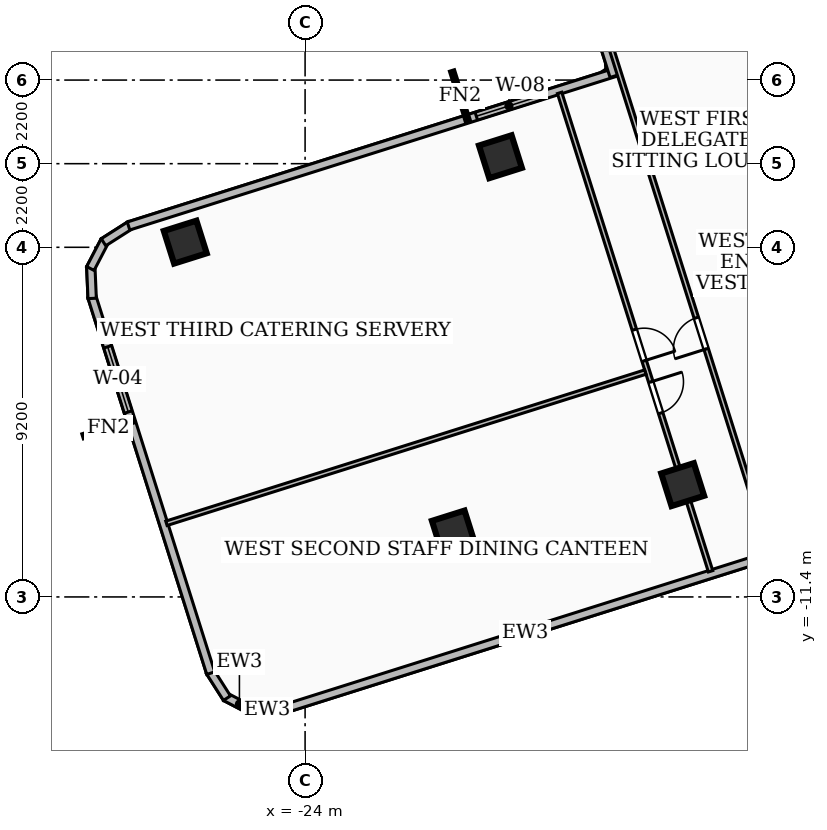
"""IFC4 building model, lengths in metres.
Left out: names, types, materials, properties, quantities, classifications, styles, units other than length and angle.
Written with IfcOpenShell. Run it as: python <this file> out.ifc"""

import sys

from ifc_helpers import new_model, si_unit, direction, frame, frame_2d, origin, origin_2d, place, context, subcontext, project, spatial, rectangle, extrude, element, fill, save


model = new_model("IFC4")
c1 = context("Model", 3, precision=1e-05, world=origin(), true_north=direction((0.0, 1.0)))
c2 = subcontext(c1, "Body", "Model", "MODEL_VIEW")
j1 = project(units=[si_unit("LENGTHUNIT", "METRE"), si_unit("PLANEANGLEUNIT", "RADIAN")], contexts=[c1])
p1 = place(None, origin())
s1 = spatial("IfcSite", under=j1, at=p1, CompositionType="ELEMENT")
p2 = place(p1, origin())
s2 = spatial("IfcBuilding", under=s1, at=p2, CompositionType="ELEMENT")
p3 = place(p2, frame((0.0, 0.0, 152.28)))
s3 = spatial("IfcBuildingStorey", under=s2, at=p3, CompositionType="ELEMENT", Elevation=152.28)
for number, where, z_axis, x_axis in (
    (1, (-18.86, 0.183, 0.0), (0.0, 0.0, 1.0), (0.954, 0.301, 0.0)),
    (2, (-14.064, -8.445, 0.0), (0.0, 0.0, 1.0), (0.954, 0.301, 0.0)),
    (3, (-27.153, -2.064, 0.0), (0.0, 0.0, 1.0), (0.954, 0.301, 0.0)),
    (4, (-20.098, -9.692, 0.0), (0.0, 0.0, 1.0), (0.954, 0.301, 0.0)),
):
    element("IfcColumn", number, at=place(p3, frame(where, z_axis=z_axis, x_axis=x_axis)), inside=s3, PredefinedType="COLUMN", context=c2, shape_type="SweptSolid", body=[
        extrude(rectangle(XDim=0.9, YDim=0.9, at=origin_2d()), origin(), (0.0, 0.0, 1.0), 3.6),
    ])
p4 = place(p3, frame((-11.792, -10.319, 0.0), z_axis=(0.0, 0.0, 1.0), x_axis=(-0.953607060649, -0.301054104573, 0.0)))
e5 = element("IfcWall", 5, at=p4, inside=s3, PredefinedType="SOLIDWALL", context=c2, shape_type="SweptSolid", body=[
    extrude(rectangle(XDim=13.459, YDim=0.22, at=frame_2d((6.73, 0.0))), origin(), (0.0, 0.0, 1.0), 2.152),
])
p5 = place(p3, frame((-24.578, -14.362, 0.0), z_axis=(0.0, 0.0, 1.0), x_axis=(-0.999075913973, -0.042980438793, 0.0)))
e6 = element("IfcWall", 6, at=p5, inside=s3, PredefinedType="SOLIDWALL", context=c2, shape_type="SweptSolid", body=[
    extrude(rectangle(XDim=0.835, YDim=0.22, at=frame_2d((0.417, 0.0))), origin(), (0.0, 0.0, 1.0), 3.34),
])
p6 = place(p3, frame((-25.365, -14.409, 0.0), z_axis=(0.0, 0.0, 1.0), x_axis=(-0.886542320322, 0.462647505427, 0.0)))
e7 = element("IfcWall", 7, at=p6, inside=s3, PredefinedType="SOLIDWALL", context=c2, shape_type="SweptSolid", body=[
    extrude(rectangle(XDim=0.819, YDim=0.22, at=frame_2d((0.41, 0.0))), origin(), (0.0, 0.0, 1.0), 3.34),
])
p7 = place(p3, frame((-26.056, -14.063, 0.0), z_axis=(0.0, 0.0, 1.0), x_axis=(-0.537481840432, 0.843275323489, 0.0)))
e8 = element("IfcWall", 8, at=p7, inside=s3, PredefinedType="SOLIDWALL", context=c2, shape_type="SweptSolid", body=[
    extrude(rectangle(XDim=0.833, YDim=0.22, at=frame_2d((0.417, 0.0))), origin(), (0.0, 0.0, 1.0), 3.34),
])
p8 = place(p3, frame((-26.483, -13.405, 0.0), z_axis=(0.0, 0.0, 1.0), x_axis=(-0.301132492372, 0.953582310049, 0.0)))
e9 = element("IfcWall", 9, at=p8, inside=s3, PredefinedType="SOLIDWALL", context=c2, shape_type="SweptSolid", body=[
    extrude(rectangle(XDim=10.391, YDim=0.22, at=frame_2d((5.196, 0.0))), origin(), (0.0, 0.0, 1.0), 3.34),
])
p9 = place(p8, frame((7.205, 0.0, 0.85)))
e10 = element("IfcOpeningElement", 10, at=p9, cuts=e9, PredefinedType="OPENING", context=c2, shape_type="SweptSolid", body=[
    extrude(rectangle(XDim=1.8, YDim=2.0, at=frame_2d((0.9, 1.0))), frame((0.0, 0.12, 0.0), z_axis=(0.0, -1.0, 0.0), x_axis=(1.0, 0.0, 0.0)), (0.0, 0.0, 1.0), 0.24),
])
p10 = place(p3, frame((-29.603, -3.545, 0.0), z_axis=(0.0, 0.0, 1.0), x_axis=(-0.042992997635, 0.99907537361, 0.0)))
e11 = element("IfcWall", 11, at=p10, inside=s3, PredefinedType="SOLIDWALL", context=c2, shape_type="SweptSolid", body=[
    extrude(rectangle(XDim=0.835, YDim=0.22, at=frame_2d((0.417, 0.0))), origin(), (0.0, 0.0, 1.0), 3.34),
])
p11 = place(p3, frame((-29.65, -2.758, 0.0), z_axis=(0.0, 0.0, 1.0), x_axis=(0.462647505427, 0.886542320322, 0.0)))
e12 = element("IfcWall", 12, at=p11, inside=s3, PredefinedType="SOLIDWALL", context=c2, shape_type="SweptSolid", body=[
    extrude(rectangle(XDim=0.819, YDim=0.22, at=frame_2d((0.41, 0.0))), origin(), (0.0, 0.0, 1.0), 3.34),
])
p12 = place(p3, frame((-29.304, -2.067, 0.0), z_axis=(0.0, 0.0, 1.0), x_axis=(0.843275323489, 0.537481840432, 0.0)))
e13 = element("IfcWall", 13, at=p12, inside=s3, PredefinedType="SOLIDWALL", context=c2, shape_type="SweptSolid", body=[
    extrude(rectangle(XDim=0.833, YDim=0.22, at=frame_2d((0.417, 0.0))), origin(), (0.0, 0.0, 1.0), 3.34),
])
p13 = place(p3, frame((-28.646, -1.64, 0.0), z_axis=(0.0, 0.0, 1.0), x_axis=(0.953626521982, 0.300992452685, 0.0)))
e14 = element("IfcWall", 14, at=p13, inside=s3, PredefinedType="SOLIDWALL", context=c2, shape_type="SweptSolid", body=[
    extrude(rectangle(XDim=13.458, YDim=0.22, at=frame_2d((6.729, 0.0))), origin(), (0.0, 0.0, 1.0), 3.34),
])
p14 = place(p13, frame((9.597, 0.0, 0.85)))
e15 = element("IfcOpeningElement", 15, at=p14, cuts=e14, PredefinedType="OPENING", context=c2, shape_type="SweptSolid", body=[
    extrude(rectangle(XDim=1.8, YDim=1.8, at=frame_2d((0.9, 0.9))), frame((0.0, 0.12, 0.0), z_axis=(0.0, -1.0, 0.0), x_axis=(1.0, 0.0, 0.0)), (0.0, 0.0, 1.0), 0.24),
])
p15 = place(p3, frame((-15.87, 2.301, 0.0), z_axis=(0.0, 0.0, 1.0), x_axis=(-0.300910882413, 0.953652264112, 0.0)))
e16 = element("IfcWall", 16, at=p15, inside=s3, PredefinedType="SOLIDWALL", context=c2, shape_type="SweptSolid", body=[
    extrude(rectangle(XDim=5.989, YDim=0.22, at=frame_2d((2.994, 0.0))), origin(), (0.0, 0.0, 1.0), 3.34),
])
p16 = place(p3, frame((-10.379, -14.591, 0.0), z_axis=(0.0, 0.0, 1.0), x_axis=(-0.301070726534, 0.95360181293, 0.0)))
e17 = element("IfcWall", 17, at=p16, inside=s3, PredefinedType="PARTITIONING", context=c2, shape_type="SweptSolid", body=[
    extrude(rectangle(XDim=20.81, YDim=0.12, at=frame_2d((10.405, 0.0))), origin(), (0.0, 0.0, 1.0), 2.152),
])
p17 = place(p16, frame((10.189, 0.0, 0.0)))
e18 = element("IfcOpeningElement", 18, at=p17, cuts=e17, PredefinedType="OPENING", context=c2, shape_type="SweptSolid", body=[
    extrude(rectangle(XDim=0.86, YDim=2.0, at=frame_2d((0.43, 1.0))), frame((0.0, 0.07, 0.0), z_axis=(0.0, -1.0, 0.0), x_axis=(1.0, 0.0, 0.0)), (0.0, 0.0, 1.0), 0.14),
])
p18 = place(p3, frame((-15.047, -5.484, 0.0), z_axis=(0.0, 0.0, 1.0), x_axis=(-0.95359383289, -0.301096001093, 0.0)))
e19 = element("IfcWall", 19, at=p18, inside=s3, PredefinedType="PARTITIONING", context=c2, shape_type="SweptSolid", body=[
    extrude(rectangle(XDim=13.215, YDim=0.12, at=frame_2d((6.607, 0.0))), origin(), (0.0, 0.0, 1.0), 2.152),
])
p19 = place(p3, frame((-17.303, 1.863, 0.0), z_axis=(0.0, 0.0, 1.0), x_axis=(0.300972919735, -0.953632686933, 0.0)))
e20 = element("IfcWall", 20, at=p19, inside=s3, PredefinedType="PARTITIONING", context=c2, shape_type="SweptSolid", body=[
    extrude(rectangle(XDim=13.2, YDim=0.12, at=frame_2d((6.6, 0.0))), origin(), (0.0, 0.0, 1.0), 2.152),
])
p20 = place(p19, frame((6.534, 0.0, 0.0)))
e21 = element("IfcOpeningElement", 21, at=p20, cuts=e20, PredefinedType="OPENING", context=c2, shape_type="SweptSolid", body=[
    extrude(rectangle(XDim=0.86, YDim=2.04, at=frame_2d((0.43, 1.02))), frame((0.0, 0.07, 0.0), z_axis=(0.0, -1.0, 0.0), x_axis=(1.0, 0.0, 0.0)), (0.0, 0.0, 1.0), 0.14),
])
p21 = place(p19, frame((7.975, 0.0, 0.0)))
e22 = element("IfcOpeningElement", 22, at=p21, cuts=e20, PredefinedType="OPENING", context=c2, shape_type="SweptSolid", body=[
    extrude(rectangle(XDim=0.86, YDim=2.04, at=frame_2d((0.43, 1.02))), frame((0.0, 0.07, 0.0), z_axis=(0.0, -1.0, 0.0), x_axis=(1.0, 0.0, 0.0)), (0.0, 0.0, 1.0), 0.14),
])
p22 = place(p9, origin())
e23 = element("IfcWindow", 23, at=p22, inside=s3, PartitioningType="SINGLE_PANEL", PredefinedType="WINDOW", context=c2, shape_type="SweptSolid", body=[
    extrude(rectangle(XDim=1.8, YDim=2.0, at=frame_2d((0.9, 1.0))), frame((0.0, 0.03, 0.0), z_axis=(0.0, -1.0, 0.0), x_axis=(1.0, 0.0, 0.0)), (0.0, 0.0, 1.0), 0.06),
])
fill(e10, e23)
p23 = place(p14, origin())
e24 = element("IfcWindow", 24, at=p23, inside=s3, PartitioningType="SINGLE_PANEL", PredefinedType="WINDOW", context=c2, shape_type="SweptSolid", body=[
    extrude(rectangle(XDim=1.8, YDim=1.8, at=frame_2d((0.9, 0.9))), frame((0.0, 0.03, 0.0), z_axis=(0.0, -1.0, 0.0), x_axis=(1.0, 0.0, 0.0)), (0.0, 0.0, 1.0), 0.06),
])
fill(e15, e24)
p24 = place(p17, origin())
e25 = element("IfcDoor", 25, at=p24, inside=s3, OperationType="SINGLE_SWING_LEFT", PredefinedType="DOOR", context=c2, shape_type="SweptSolid", body=[
    extrude(rectangle(XDim=0.86, YDim=2.0, at=frame_2d((0.43, 1.0))), frame((0.0, 0.025, 0.0), z_axis=(0.0, -1.0, 0.0), x_axis=(1.0, 0.0, 0.0)), (0.0, 0.0, 1.0), 0.05),
])
fill(e18, e25)
p25 = place(p20, origin())
e26 = element("IfcDoor", 26, at=p25, inside=s3, OperationType="SINGLE_SWING_RIGHT", PredefinedType="DOOR", context=c2, shape_type="SweptSolid", body=[
    extrude(rectangle(XDim=0.86, YDim=2.04, at=frame_2d((0.43, 1.02))), frame((0.0, 0.025, 0.0), z_axis=(0.0, -1.0, 0.0), x_axis=(1.0, 0.0, 0.0)), (0.0, 0.0, 1.0), 0.05),
])
fill(e21, e26)
p26 = place(p21, origin())
e27 = element("IfcDoor", 27, at=p26, inside=s3, OperationType="SINGLE_SWING_LEFT", PredefinedType="DOOR", context=c2, shape_type="SweptSolid", body=[
    extrude(rectangle(XDim=0.86, YDim=2.04, at=frame_2d((0.43, 1.02))), frame((0.0, 0.025, 0.0), z_axis=(0.0, -1.0, 0.0), x_axis=(1.0, 0.0, 0.0)), (0.0, 0.0, 1.0), 0.05),
])
fill(e22, e27)
save(model, sys.argv[1])
